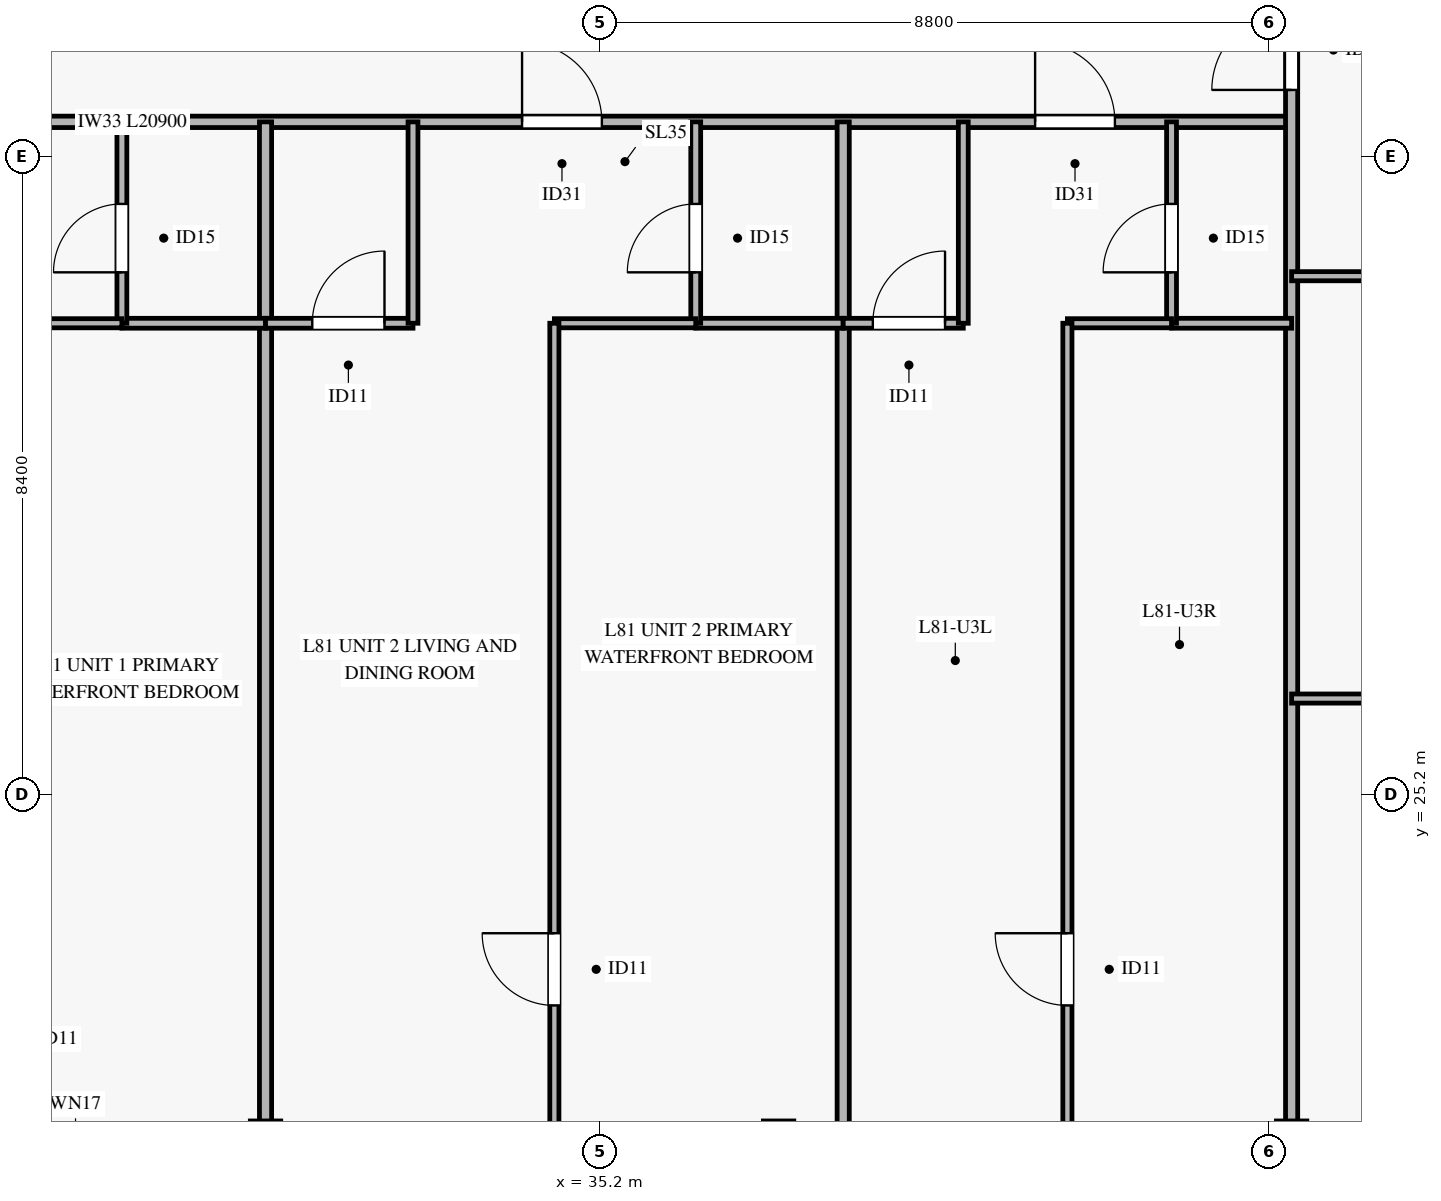
"""IFC4 building model, lengths in metres.
Left out: names, types, materials, properties, quantities, classifications, styles, units other than length and angle.
Written with IfcOpenShell. Run it as: python <this file> out.ifc"""

import sys

from ifc_helpers import new_model, si_unit, direction, frame, frame_2d, origin, place, context, subcontext, project, spatial, rectangle, extrude, source, transform, mapped, element, fill, save


model = new_model("IFC4")
c1 = context("Model", 3, precision=1e-05, world=origin(), true_north=direction((0.0, 1.0)))
c2 = subcontext(c1, "Body", "Model", "MODEL_VIEW")
j1 = project(units=[si_unit("LENGTHUNIT", "METRE"), si_unit("PLANEANGLEUNIT", "RADIAN")], contexts=[c1])
p1 = place(None, origin())
s1 = spatial("IfcSite", under=j1, at=p1, CompositionType="ELEMENT")
p2 = place(p1, origin())
s2 = spatial("IfcBuilding", under=s1, at=p2, CompositionType="ELEMENT")
p3 = place(p2, frame((0.0, 0.0, 314.2)))
s3 = spatial("IfcBuildingStorey", under=s2, at=p3, CompositionType="ELEMENT", Elevation=314.2)
p4 = place(p3, frame((23.4, 34.05, 0.0), z_axis=(0.0, 0.0, 1.0), x_axis=(1.0, 0.0, 0.0)))
e1 = element("IfcWall", 1, at=p4, inside=s3, PredefinedType="PARTITIONING", context=c2, shape_type="SweptSolid", body=[
    extrude(rectangle(XDim=20.9, YDim=0.15, at=frame_2d((10.45, 0.0))), origin(), (0.0, 0.0, 1.0), 2.47),
])
p5 = place(p4, frame((3.275, 0.0, 0.0)))
e2 = element("IfcOpeningElement", 2, at=p5, cuts=e1, PredefinedType="OPENING", context=c2, shape_type="SweptSolid", body=[
    extrude(rectangle(XDim=1.05, YDim=2.15, at=frame_2d((0.525, 1.075))), frame((0.0, 0.085, 0.0), z_axis=(0.0, -1.0, 0.0), x_axis=(1.0, 0.0, 0.0)), (0.0, 0.0, 1.0), 0.17),
])
p6 = place(p4, frame((10.775, 0.0, 0.0)))
e3 = element("IfcOpeningElement", 3, at=p6, cuts=e1, PredefinedType="OPENING", context=c2, shape_type="SweptSolid", body=[
    extrude(rectangle(XDim=1.05, YDim=2.15, at=frame_2d((0.525, 1.075))), frame((0.0, 0.085, 0.0), z_axis=(0.0, -1.0, 0.0), x_axis=(1.0, 0.0, 0.0)), (0.0, 0.0, 1.0), 0.17),
])
p7 = place(p4, frame((17.525, 0.0, 0.0)))
e4 = element("IfcOpeningElement", 4, at=p7, cuts=e1, PredefinedType="OPENING", context=c2, shape_type="SweptSolid", body=[
    extrude(rectangle(XDim=1.05, YDim=2.15, at=frame_2d((0.525, 1.075))), frame((0.0, 0.085, 0.0), z_axis=(0.0, -1.0, 0.0), x_axis=(1.0, 0.0, 0.0)), (0.0, 0.0, 1.0), 0.17),
])
p8 = place(p3, frame((30.8, 20.704, 0.0), z_axis=(0.0, 0.0, 1.0), x_axis=(0.0, 1.0, 0.0)))
e5 = element("IfcWall", 5, at=p8, inside=s3, PredefinedType="PARTITIONING", context=c2, shape_type="SweptSolid", body=[
    extrude(rectangle(XDim=13.346, YDim=0.16, at=frame_2d((6.673, 0.0))), origin(), (0.0, 0.0, 1.0), 2.47),
])
p9 = place(p3, frame((38.4, 20.704, 0.0), z_axis=(0.0, 0.0, 1.0), x_axis=(0.0, 1.0, 0.0)))
e6 = element("IfcWall", 6, at=p9, inside=s3, PredefinedType="PARTITIONING", context=c2, shape_type="SweptSolid", body=[
    extrude(rectangle(XDim=13.346, YDim=0.16, at=frame_2d((6.673, 0.0))), origin(), (0.0, 0.0, 1.0), 2.77),
])
p10 = place(p3, frame((44.3, 20.704, 0.0), z_axis=(0.0, 0.0, 1.0), x_axis=(0.0, 1.0, 0.0)))
e7 = element("IfcWall", 7, at=p10, inside=s3, PredefinedType="PARTITIONING", context=c2, shape_type="SweptSolid", body=[
    extrude(rectangle(XDim=16.746, YDim=0.16, at=frame_2d((8.373, 0.0))), origin(), (0.0, 0.0, 1.0), 2.47),
])
p11 = place(p10, frame((13.766, 0.0, 0.0)))
e8 = element("IfcOpeningElement", 8, at=p11, cuts=e7, PredefinedType="OPENING", context=c2, shape_type="SweptSolid", body=[
    extrude(rectangle(XDim=1.05, YDim=2.15, at=frame_2d((0.525, 1.075))), frame((0.0, 0.09, 0.0), z_axis=(0.0, -1.0, 0.0), x_axis=(1.0, 0.0, 0.0)), (0.0, 0.0, 1.0), 0.18),
])
p12 = place(p3, frame((28.91, 31.4, 0.0), z_axis=(0.0, 0.0, 1.0), x_axis=(1.0, 0.0, 0.0)))
e9 = element("IfcWall", 9, at=p12, inside=s3, PredefinedType="PARTITIONING", context=c2, shape_type="SweptSolid", body=[
    extrude(rectangle(XDim=1.89, YDim=0.13, at=frame_2d((0.945, 0.0))), origin(), (0.0, 0.0, 1.0), 2.47),
])
p13 = place(p3, frame((28.91, 31.4, 0.0), z_axis=(0.0, 0.0, 1.0), x_axis=(0.0, 1.0, 0.0)))
e10 = element("IfcWall", 10, at=p13, inside=s3, PredefinedType="PARTITIONING", context=c2, shape_type="SweptSolid", body=[
    extrude(rectangle(XDim=2.65, YDim=0.13, at=frame_2d((1.325, 0.0))), origin(), (0.0, 0.0, 1.0), 2.77),
])
p14 = place(p13, frame((0.67, 0.0, 0.0)))
e11 = element("IfcOpeningElement", 11, at=p14, cuts=e10, PredefinedType="OPENING", context=c2, shape_type="SweptSolid", body=[
    extrude(rectangle(XDim=0.9, YDim=2.1, at=frame_2d((0.45, 1.05))), frame((0.0, 0.075, 0.0), z_axis=(0.0, -1.0, 0.0), x_axis=(1.0, 0.0, 0.0)), (0.0, 0.0, 1.0), 0.15),
])
p15 = place(p3, frame((27.1, 31.4, 0.0), z_axis=(0.0, 0.0, 1.0), x_axis=(1.0, 0.0, 0.0)))
e12 = element("IfcWall", 12, at=p15, inside=s3, PredefinedType="PARTITIONING", context=c2, shape_type="SweptSolid", body=[
    extrude(rectangle(XDim=1.81, YDim=0.12, at=frame_2d((0.905, 0.0))), origin(), (0.0, 0.0, 1.0), 3.185),
])
p16 = place(p3, frame((30.8, 31.4, 0.0), z_axis=(0.0, 0.0, 1.0), x_axis=(1.0, 0.0, 0.0)))
e13 = element("IfcWall", 13, at=p16, inside=s3, PredefinedType="PARTITIONING", context=c2, shape_type="SweptSolid", body=[
    extrude(rectangle(XDim=1.94, YDim=0.13, at=frame_2d((0.97, 0.0))), origin(), (0.0, 0.0, 1.0), 2.47),
])
p17 = place(p16, frame((0.615, 0.0, 0.0)))
e14 = element("IfcOpeningElement", 14, at=p17, cuts=e13, PredefinedType="OPENING", context=c2, shape_type="SweptSolid", body=[
    extrude(rectangle(XDim=0.95, YDim=2.1, at=frame_2d((0.475, 1.05))), frame((0.0, 0.075, 0.0), z_axis=(0.0, -1.0, 0.0), x_axis=(1.0, 0.0, 0.0)), (0.0, 0.0, 1.0), 0.15),
])
p18 = place(p3, frame((32.74, 31.4, 0.0), z_axis=(0.0, 0.0, 1.0), x_axis=(0.0, 1.0, 0.0)))
e15 = element("IfcWall", 15, at=p18, inside=s3, PredefinedType="PARTITIONING", context=c2, shape_type="SweptSolid", body=[
    extrude(rectangle(XDim=2.65, YDim=0.13, at=frame_2d((1.325, 0.0))), origin(), (0.0, 0.0, 1.0), 2.77),
])
p19 = place(p3, frame((36.46, 31.4, 0.0), z_axis=(0.0, 0.0, 1.0), x_axis=(1.0, 0.0, 0.0)))
e16 = element("IfcWall", 16, at=p19, inside=s3, PredefinedType="PARTITIONING", context=c2, shape_type="SweptSolid", body=[
    extrude(rectangle(XDim=1.94, YDim=0.13, at=frame_2d((0.97, 0.0))), origin(), (0.0, 0.0, 1.0), 2.47),
])
p20 = place(p3, frame((36.46, 31.4, 0.0), z_axis=(0.0, 0.0, 1.0), x_axis=(0.0, 1.0, 0.0)))
e17 = element("IfcWall", 17, at=p20, inside=s3, PredefinedType="PARTITIONING", context=c2, shape_type="SweptSolid", body=[
    extrude(rectangle(XDim=2.65, YDim=0.13, at=frame_2d((1.325, 0.0))), origin(), (0.0, 0.0, 1.0), 2.77),
])
p21 = place(p20, frame((0.67, 0.0, 0.0)))
e18 = element("IfcOpeningElement", 18, at=p21, cuts=e17, PredefinedType="OPENING", context=c2, shape_type="SweptSolid", body=[
    extrude(rectangle(XDim=0.9, YDim=2.1, at=frame_2d((0.45, 1.05))), frame((0.0, 0.075, 0.0), z_axis=(0.0, -1.0, 0.0), x_axis=(1.0, 0.0, 0.0)), (0.0, 0.0, 1.0), 0.15),
])
p22 = place(p3, frame((34.6, 31.4, 0.0), z_axis=(0.0, 0.0, 1.0), x_axis=(1.0, 0.0, 0.0)))
e19 = element("IfcWall", 19, at=p22, inside=s3, PredefinedType="PARTITIONING", context=c2, shape_type="SweptSolid", body=[
    extrude(rectangle(XDim=1.86, YDim=0.12, at=frame_2d((0.93, 0.0))), origin(), (0.0, 0.0, 1.0), 3.185),
])
p23 = place(p3, frame((34.6, 20.704, 0.0), z_axis=(0.0, 0.0, 1.0), x_axis=(0.0, 1.0, 0.0)))
e20 = element("IfcWall", 20, at=p23, inside=s3, PredefinedType="PARTITIONING", context=c2, shape_type="SweptSolid", body=[
    extrude(rectangle(XDim=10.696, YDim=0.12, at=frame_2d((5.348, 0.0))), origin(), (0.0, 0.0, 1.0), 2.77),
])
p24 = place(p23, frame((1.72, 0.0, 0.0)))
e21 = element("IfcOpeningElement", 21, at=p24, cuts=e20, PredefinedType="OPENING", context=c2, shape_type="SweptSolid", body=[
    extrude(rectangle(XDim=0.95, YDim=2.1, at=frame_2d((0.475, 1.05))), frame((0.0, 0.07, 0.0), z_axis=(0.0, -1.0, 0.0), x_axis=(1.0, 0.0, 0.0)), (0.0, 0.0, 1.0), 0.14),
])
p25 = place(p3, frame((38.4, 31.4, 0.0), z_axis=(0.0, 0.0, 1.0), x_axis=(1.0, 0.0, 0.0)))
e22 = element("IfcWall", 22, at=p25, inside=s3, PredefinedType="PARTITIONING", context=c2, shape_type="SweptSolid", body=[
    extrude(rectangle(XDim=1.58, YDim=0.13, at=frame_2d((0.79, 0.0))), origin(), (0.0, 0.0, 1.0), 3.185),
])
p26 = place(p25, frame((0.39, 0.0, 0.0)))
e23 = element("IfcOpeningElement", 23, at=p26, cuts=e22, PredefinedType="OPENING", context=c2, shape_type="SweptSolid", body=[
    extrude(rectangle(XDim=0.95, YDim=2.1, at=frame_2d((0.475, 1.05))), frame((0.0, 0.075, 0.0), z_axis=(0.0, -1.0, 0.0), x_axis=(1.0, 0.0, 0.0)), (0.0, 0.0, 1.0), 0.15),
])
p27 = place(p3, frame((39.98, 31.4, 0.0), z_axis=(0.0, 0.0, 1.0), x_axis=(0.0, 1.0, 0.0)))
e24 = element("IfcWall", 24, at=p27, inside=s3, PredefinedType="PARTITIONING", context=c2, shape_type="SweptSolid", body=[
    extrude(rectangle(XDim=2.65, YDim=0.13, at=frame_2d((1.325, 0.0))), origin(), (0.0, 0.0, 1.0), 2.77),
])
p28 = place(p3, frame((42.72, 31.4, 0.0), z_axis=(0.0, 0.0, 1.0), x_axis=(1.0, 0.0, 0.0)))
e25 = element("IfcWall", 25, at=p28, inside=s3, PredefinedType="PARTITIONING", context=c2, shape_type="SweptSolid", body=[
    extrude(rectangle(XDim=1.58, YDim=0.13, at=frame_2d((0.79, 0.0))), origin(), (0.0, 0.0, 1.0), 2.47),
])
p29 = place(p3, frame((42.72, 31.4, 0.0), z_axis=(0.0, 0.0, 1.0), x_axis=(0.0, 1.0, 0.0)))
e26 = element("IfcWall", 26, at=p29, inside=s3, PredefinedType="PARTITIONING", context=c2, shape_type="SweptSolid", body=[
    extrude(rectangle(XDim=2.65, YDim=0.13, at=frame_2d((1.325, 0.0))), origin(), (0.0, 0.0, 1.0), 2.77),
])
p30 = place(p29, frame((0.67, 0.0, 0.0)))
e27 = element("IfcOpeningElement", 27, at=p30, cuts=e26, PredefinedType="OPENING", context=c2, shape_type="SweptSolid", body=[
    extrude(rectangle(XDim=0.9, YDim=2.1, at=frame_2d((0.45, 1.05))), frame((0.0, 0.075, 0.0), z_axis=(0.0, -1.0, 0.0), x_axis=(1.0, 0.0, 0.0)), (0.0, 0.0, 1.0), 0.15),
])
p31 = place(p3, frame((41.35, 31.4, 0.0), z_axis=(0.0, 0.0, 1.0), x_axis=(1.0, 0.0, 0.0)))
e28 = element("IfcWall", 28, at=p31, inside=s3, PredefinedType="PARTITIONING", context=c2, shape_type="SweptSolid", body=[
    extrude(rectangle(XDim=1.37, YDim=0.12, at=frame_2d((0.685, 0.0))), origin(), (0.0, 0.0, 1.0), 3.185),
])
p32 = place(p3, frame((41.35, 20.704, 0.0), z_axis=(0.0, 0.0, 1.0), x_axis=(0.0, 1.0, 0.0)))
e29 = element("IfcWall", 29, at=p32, inside=s3, PredefinedType="PARTITIONING", context=c2, shape_type="SweptSolid", body=[
    extrude(rectangle(XDim=10.696, YDim=0.12, at=frame_2d((5.348, 0.0))), origin(), (0.0, 0.0, 1.0), 2.77),
])
p33 = place(p32, frame((1.72, 0.0, 0.0)))
e30 = element("IfcOpeningElement", 30, at=p33, cuts=e29, PredefinedType="OPENING", context=c2, shape_type="SweptSolid", body=[
    extrude(rectangle(XDim=0.95, YDim=2.1, at=frame_2d((0.475, 1.05))), frame((0.0, 0.07, 0.0), z_axis=(0.0, -1.0, 0.0), x_axis=(1.0, 0.0, 0.0)), (0.0, 0.0, 1.0), 0.14),
])
p34 = place(p3, frame((44.3, 26.462, 0.0), z_axis=(0.0, 0.0, 1.0), x_axis=(1.0, 0.0, 0.0)))
e31 = element("IfcWall", 31, at=p34, inside=s3, PredefinedType="PARTITIONING", context=c2, shape_type="SweptSolid", body=[
    extrude(rectangle(XDim=15.246, YDim=0.12, at=frame_2d((7.623, 0.0))), origin(), (0.0, 0.0, 1.0), 2.47),
])
p35 = place(p34, frame((6.184, 0.0, 0.0)))
e32 = element("IfcOpeningElement", 32, at=p35, cuts=e31, PredefinedType="OPENING", context=c2, shape_type="SweptSolid", body=[
    extrude(rectangle(XDim=0.95, YDim=2.1, at=frame_2d((0.475, 1.05))), frame((0.0, 0.07, 0.0), z_axis=(0.0, -1.0, 0.0), x_axis=(1.0, 0.0, 0.0)), (0.0, 0.0, 1.0), 0.14),
])
p36 = place(p3, frame((44.3, 32.019, 0.0), z_axis=(0.0, 0.0, 1.0), x_axis=(1.0, 0.0, 0.0)))
e33 = element("IfcWall", 33, at=p36, inside=s3, PredefinedType="PARTITIONING", context=c2, shape_type="SweptSolid", body=[
    extrude(rectangle(XDim=15.246, YDim=0.12, at=frame_2d((7.623, 0.0))), origin(), (0.0, 0.0, 1.0), 2.47),
])
p37 = place(p36, frame((6.184, 0.0, 0.0)))
e34 = element("IfcOpeningElement", 34, at=p37, cuts=e33, PredefinedType="OPENING", context=c2, shape_type="SweptSolid", body=[
    extrude(rectangle(XDim=0.95, YDim=2.1, at=frame_2d((0.475, 1.05))), frame((0.0, 0.07, 0.0), z_axis=(0.0, -1.0, 0.0), x_axis=(1.0, 0.0, 0.0)), (0.0, 0.0, 1.0), 0.14),
])
m1 = source(origin(), c2, "Body", "SweptSolid", [
    extrude(rectangle(XDim=0.9, YDim=2.1, at=frame_2d((0.45, 1.05))), frame((0.0, 0.025, 0.0), z_axis=(0.0, -1.0, 0.0), x_axis=(1.0, 0.0, 0.0)), (0.0, 0.0, 1.0), 0.05),
])
p38 = place(p14, origin())
e35 = element("IfcDoor", 35, at=p38, inside=s3, OperationType="SINGLE_SWING_LEFT", PredefinedType="DOOR", context=c2, shape_type="MappedRepresentation", body=[
    mapped(m1, transform((0.0, 0.0, 0.0), x_axis=(1.0, 0.0, 0.0), y_axis=(0.0, 1.0, 0.0), z_axis=(0.0, 0.0, 1.0), scale=1.0)),
])
fill(e11, e35)
m2 = source(origin(), c2, "Body", "SweptSolid", [
    extrude(rectangle(XDim=1.05, YDim=2.15, at=frame_2d((0.525, 1.075))), frame((0.0, 0.025, 0.0), z_axis=(0.0, -1.0, 0.0), x_axis=(1.0, 0.0, 0.0)), (0.0, 0.0, 1.0), 0.05),
])
p39 = place(p6, origin())
e36 = element("IfcDoor", 36, at=p39, inside=s3, OperationType="SINGLE_SWING_LEFT", PredefinedType="DOOR", context=c2, shape_type="MappedRepresentation", body=[
    mapped(m2, transform((0.0, 0.0, 0.0), x_axis=(1.0, 0.0, 0.0), y_axis=(0.0, 1.0, 0.0), z_axis=(0.0, 0.0, 1.0), scale=1.0)),
])
fill(e3, e36)
m3 = source(origin(), c2, "Body", "SweptSolid", [
    extrude(rectangle(XDim=0.95, YDim=2.1, at=frame_2d((0.475, 1.05))), frame((0.0, 0.025, 0.0), z_axis=(0.0, -1.0, 0.0), x_axis=(1.0, 0.0, 0.0)), (0.0, 0.0, 1.0), 0.05),
])
p40 = place(p17, origin())
e37 = element("IfcDoor", 37, at=p40, inside=s3, OperationType="SINGLE_SWING_RIGHT", PredefinedType="DOOR", context=c2, shape_type="MappedRepresentation", body=[
    mapped(m3, transform((0.0, 0.0, 0.0), x_axis=(1.0, 0.0, 0.0), y_axis=(0.0, 1.0, 0.0), z_axis=(0.0, 0.0, 1.0), scale=1.0)),
])
fill(e14, e37)
p41 = place(p21, origin())
e38 = element("IfcDoor", 38, at=p41, inside=s3, OperationType="SINGLE_SWING_LEFT", PredefinedType="DOOR", context=c2, shape_type="MappedRepresentation", body=[
    mapped(m1, transform((0.0, 0.0, 0.0), x_axis=(1.0, 0.0, 0.0), y_axis=(0.0, 1.0, 0.0), z_axis=(0.0, 0.0, 1.0), scale=1.0)),
])
fill(e18, e38)
p42 = place(p24, origin())
e39 = element("IfcDoor", 39, at=p42, inside=s3, OperationType="SINGLE_SWING_RIGHT", PredefinedType="DOOR", context=c2, shape_type="MappedRepresentation", body=[
    mapped(m3, transform((0.0, 0.0, 0.0), x_axis=(1.0, 0.0, 0.0), y_axis=(0.0, 1.0, 0.0), z_axis=(0.0, 0.0, 1.0), scale=1.0)),
])
fill(e21, e39)
p43 = place(p7, origin())
e40 = element("IfcDoor", 40, at=p43, inside=s3, OperationType="SINGLE_SWING_LEFT", PredefinedType="DOOR", context=c2, shape_type="MappedRepresentation", body=[
    mapped(m2, transform((0.0, 0.0, 0.0), x_axis=(1.0, 0.0, 0.0), y_axis=(0.0, 1.0, 0.0), z_axis=(0.0, 0.0, 1.0), scale=1.0)),
])
fill(e4, e40)
p44 = place(p26, origin())
e41 = element("IfcDoor", 41, at=p44, inside=s3, OperationType="SINGLE_SWING_RIGHT", PredefinedType="DOOR", context=c2, shape_type="MappedRepresentation", body=[
    mapped(m3, transform((0.0, 0.0, 0.0), x_axis=(1.0, 0.0, 0.0), y_axis=(0.0, 1.0, 0.0), z_axis=(0.0, 0.0, 1.0), scale=1.0)),
])
fill(e23, e41)
p45 = place(p30, origin())
e42 = element("IfcDoor", 42, at=p45, inside=s3, OperationType="SINGLE_SWING_LEFT", PredefinedType="DOOR", context=c2, shape_type="MappedRepresentation", body=[
    mapped(m1, transform((0.0, 0.0, 0.0), x_axis=(1.0, 0.0, 0.0), y_axis=(0.0, 1.0, 0.0), z_axis=(0.0, 0.0, 1.0), scale=1.0)),
])
fill(e27, e42)
p46 = place(p33, origin())
e43 = element("IfcDoor", 43, at=p46, inside=s3, OperationType="SINGLE_SWING_RIGHT", PredefinedType="DOOR", context=c2, shape_type="MappedRepresentation", body=[
    mapped(m3, transform((0.0, 0.0, 0.0), x_axis=(1.0, 0.0, 0.0), y_axis=(0.0, 1.0, 0.0), z_axis=(0.0, 0.0, 1.0), scale=1.0)),
])
fill(e30, e43)
p47 = place(p11, origin())
e44 = element("IfcDoor", 44, at=p47, inside=s3, OperationType="SINGLE_SWING_LEFT", PredefinedType="DOOR", context=c2, shape_type="MappedRepresentation", body=[
    mapped(m2, transform((0.0, 0.0, 0.0), x_axis=(1.0, 0.0, 0.0), y_axis=(0.0, 1.0, 0.0), z_axis=(0.0, 0.0, 1.0), scale=1.0)),
])
fill(e8, e44)
save(model, sys.argv[1])
